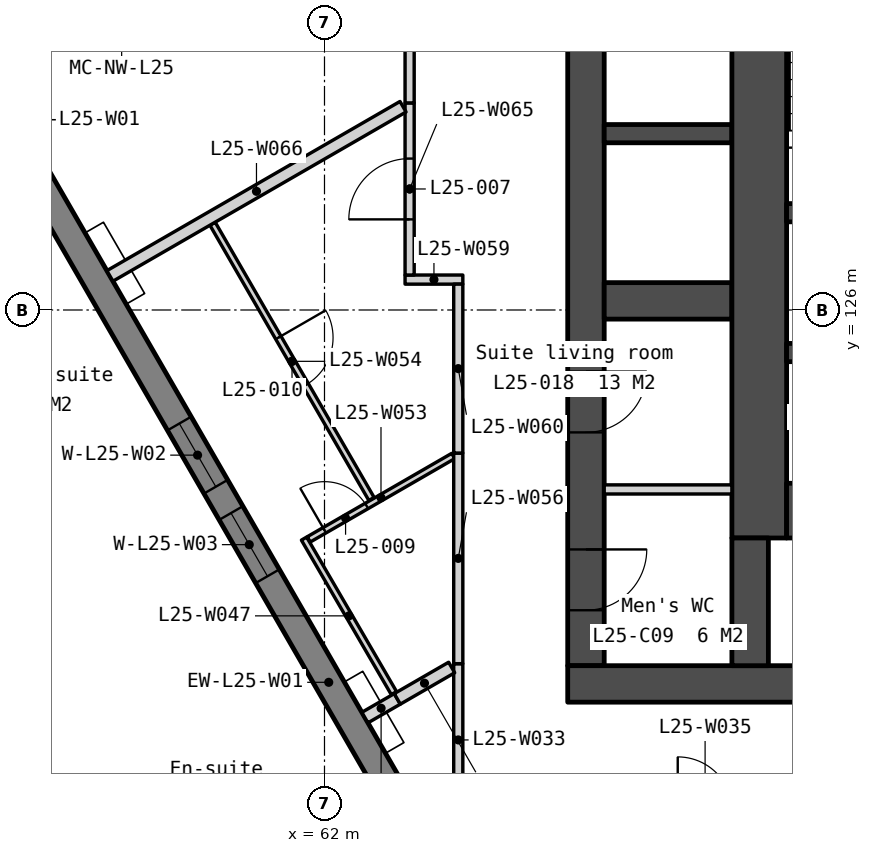
"""IFC4 building model, lengths in metres.
Left out: names, types, materials, properties, quantities, classifications, styles, units other than length and angle.
Written with IfcOpenShell. Run it as: python <this file> out.ifc"""

import sys

from ifc_helpers import new_model, si_unit, direction, frame, frame_2d, origin, place, context, subcontext, project, spatial, polyline, rectangle, outline, extrude, element, fill, save


model = new_model("IFC4")
c1 = context("Model", 3, precision=1e-05, world=origin(), true_north=direction((0.0, 1.0)))
c2 = subcontext(c1, "Body", "Model", "MODEL_VIEW")
j1 = project(units=[si_unit("LENGTHUNIT", "METRE"), si_unit("PLANEANGLEUNIT", "RADIAN")], contexts=[c1])
p1 = place(None, origin())
s1 = spatial("IfcSite", under=j1, at=p1, CompositionType="ELEMENT")
p2 = place(p1, origin())
s2 = spatial("IfcBuilding", under=s1, at=p2, CompositionType="ELEMENT")
p3 = place(p2, frame((0.0, 0.0, 102.8)))
s3 = spatial("IfcBuildingStorey", under=s2, at=p3, CompositionType="ELEMENT", Elevation=102.8)
p4 = place(p3, frame((66.3, 133.95, 0.0), z_axis=(0.0, 0.0, 1.0), x_axis=(0.0, -1.0, 0.0)))
e1 = element("IfcWall", 1, at=p4, inside=s3, PredefinedType="SOLIDWALL", context=c2, shape_type="SweptSolid", body=[
    extrude(rectangle(XDim=13.8, YDim=0.6, at=frame_2d((6.9, 0.0))), origin(), (0.0, 0.0, 1.0), 3.35),
])
p5 = place(p4, frame((0.6, 0.0, 0.0)))
e2 = element("IfcOpeningElement", 2, at=p5, cuts=e1, PredefinedType="OPENING", context=c2, shape_type="SweptSolid", body=[
    extrude(rectangle(XDim=1.1, YDim=2.1, at=frame_2d((0.55, 1.05))), frame((0.0, 0.31, 0.0), z_axis=(0.0, -1.0, 0.0), x_axis=(1.0, 0.0, 0.0)), (0.0, 0.0, 1.0), 0.62),
])
p6 = place(p4, frame((8.963, 0.0, 0.0)))
e3 = element("IfcOpeningElement", 3, at=p6, cuts=e1, PredefinedType="OPENING", context=c2, shape_type="SweptSolid", body=[
    extrude(rectangle(XDim=1.0, YDim=2.1, at=frame_2d((0.5, 1.05))), frame((0.0, 0.31, 0.0), z_axis=(0.0, -1.0, 0.0), x_axis=(1.0, 0.0, 0.0)), (0.0, 0.0, 1.0), 0.62),
])
p7 = place(p4, frame((11.888, 0.0, 0.0)))
e4 = element("IfcOpeningElement", 4, at=p7, cuts=e1, PredefinedType="OPENING", context=c2, shape_type="SweptSolid", body=[
    extrude(rectangle(XDim=1.0, YDim=2.1, at=frame_2d((0.5, 1.05))), frame((0.0, 0.31, 0.0), z_axis=(0.0, -1.0, 0.0), x_axis=(1.0, 0.0, 0.0)), (0.0, 0.0, 1.0), 0.62),
])
p8 = place(p3, frame((66.0, 119.85, 0.0), z_axis=(0.0, 0.0, 1.0), x_axis=(1.0, 0.0, 0.0)))
e5 = element("IfcWall", 5, at=p8, inside=s3, PredefinedType="SOLIDWALL", context=c2, shape_type="SweptSolid", body=[
    extrude(rectangle(XDim=28.0, YDim=0.6, at=frame_2d((14.0, 0.0))), origin(), (0.0, 0.0, 1.0), 3.35),
])
p9 = place(p8, frame((6.825, 0.0, 0.0)))
e6 = element("IfcOpeningElement", 6, at=p9, cuts=e5, PredefinedType="OPENING", context=c2, shape_type="SweptSolid", body=[
    extrude(rectangle(XDim=1.8, YDim=2.1, at=frame_2d((0.9, 1.05))), frame((0.0, 0.31, 0.0), z_axis=(0.0, -1.0, 0.0), x_axis=(1.0, 0.0, 0.0)), (0.0, 0.0, 1.0), 0.62),
])
p10 = place(p8, frame((15.85, 0.0, 0.0)))
e7 = element("IfcOpeningElement", 7, at=p10, cuts=e5, PredefinedType="OPENING", context=c2, shape_type="SweptSolid", body=[
    extrude(rectangle(XDim=1.5, YDim=2.1, at=frame_2d((0.75, 1.05))), frame((0.0, 0.31, 0.0), z_axis=(0.0, -1.0, 0.0), x_axis=(1.0, 0.0, 0.0)), (0.0, 0.0, 1.0), 0.62),
])
p11 = place(p8, frame((19.375, 0.0, 0.0)))
e8 = element("IfcOpeningElement", 8, at=p11, cuts=e5, PredefinedType="OPENING", context=c2, shape_type="SweptSolid", body=[
    extrude(rectangle(XDim=1.8, YDim=2.1, at=frame_2d((0.9, 1.05))), frame((0.0, 0.31, 0.0), z_axis=(0.0, -1.0, 0.0), x_axis=(1.0, 0.0, 0.0)), (0.0, 0.0, 1.0), 0.62),
])
p12 = place(p8, frame((4.425, 0.0, 0.0)))
e9 = element("IfcOpeningElement", 9, at=p12, cuts=e5, PredefinedType="OPENING", context=c2, shape_type="SweptSolid", body=[
    extrude(rectangle(XDim=1.0, YDim=2.1, at=frame_2d((0.5, 1.05))), frame((0.0, 0.31, 0.0), z_axis=(0.0, -1.0, 0.0), x_axis=(1.0, 0.0, 0.0)), (0.0, 0.0, 1.0), 0.62),
])
p13 = place(p8, frame((9.783, 0.0, 0.0)))
e10 = element("IfcOpeningElement", 10, at=p13, cuts=e5, PredefinedType="OPENING", context=c2, shape_type="SweptSolid", body=[
    extrude(rectangle(XDim=1.0, YDim=2.1, at=frame_2d((0.5, 1.05))), frame((0.0, 0.31, 0.0), z_axis=(0.0, -1.0, 0.0), x_axis=(1.0, 0.0, 0.0)), (0.0, 0.0, 1.0), 0.62),
])
p14 = place(p8, frame((11.525, 0.0, 0.0)))
e11 = element("IfcOpeningElement", 11, at=p14, cuts=e5, PredefinedType="OPENING", context=c2, shape_type="SweptSolid", body=[
    extrude(rectangle(XDim=1.0, YDim=2.1, at=frame_2d((0.5, 1.05))), frame((0.0, 0.31, 0.0), z_axis=(0.0, -1.0, 0.0), x_axis=(1.0, 0.0, 0.0)), (0.0, 0.0, 1.0), 0.62),
])
p15 = place(p8, frame((13.658, 0.0, 0.0)))
e12 = element("IfcOpeningElement", 12, at=p15, cuts=e5, PredefinedType="OPENING", context=c2, shape_type="SweptSolid", body=[
    extrude(rectangle(XDim=1.0, YDim=2.1, at=frame_2d((0.5, 1.05))), frame((0.0, 0.31, 0.0), z_axis=(0.0, -1.0, 0.0), x_axis=(1.0, 0.0, 0.0)), (0.0, 0.0, 1.0), 0.62),
])
p16 = place(p8, frame((22.575, 0.0, 0.0)))
e13 = element("IfcOpeningElement", 13, at=p16, cuts=e5, PredefinedType="OPENING", context=c2, shape_type="SweptSolid", body=[
    extrude(rectangle(XDim=1.0, YDim=2.1, at=frame_2d((0.5, 1.05))), frame((0.0, 0.31, 0.0), z_axis=(0.0, -1.0, 0.0), x_axis=(1.0, 0.0, 0.0)), (0.0, 0.0, 1.0), 0.62),
])
p17 = place(p3, frame((66.6, 128.9, 0.0), z_axis=(0.0, 0.0, 1.0), x_axis=(1.0, 0.0, 0.0)))
e14 = element("IfcWall", 14, at=p17, inside=s3, PredefinedType="SOLIDWALL", context=c2, shape_type="SweptSolid", body=[
    extrude(rectangle(XDim=2.1, YDim=0.3, at=frame_2d((1.05, 0.0))), origin(), (0.0, 0.0, 1.0), 3.35),
])
p18 = place(p3, frame((66.6, 126.15, 0.0), z_axis=(0.0, 0.0, 1.0), x_axis=(1.0, 0.0, 0.0)))
e15 = element("IfcWall", 15, at=p18, inside=s3, PredefinedType="SOLIDWALL", context=c2, shape_type="SweptSolid", body=[
    extrude(rectangle(XDim=2.1, YDim=0.6, at=frame_2d((1.05, 0.0))), origin(), (0.0, 0.0, 1.0), 3.35),
])
p19 = place(p3, frame((66.6, 123.049, 0.0), z_axis=(0.0, 0.0, 1.0), x_axis=(1.0, 0.0, 0.0)))
e16 = element("IfcWall", 16, at=p19, inside=s3, PredefinedType="PARTITIONING", context=c2, shape_type="SweptSolid", body=[
    extrude(rectangle(XDim=2.1, YDim=0.15, at=frame_2d((1.05, 0.0))), origin(), (0.0, 0.0, 1.0), 3.35),
])
p20 = place(p3, frame((69.15, 133.95, 0.0), z_axis=(0.0, 0.0, 1.0), x_axis=(0.0, -1.0, 0.0)))
e17 = element("IfcWall", 17, at=p20, inside=s3, PredefinedType="SOLIDWALL", context=c2, shape_type="SweptSolid", body=[
    extrude(rectangle(XDim=11.7, YDim=0.9, at=frame_2d((5.85, 0.0))), origin(), (0.0, 0.0, 1.0), 3.35),
])
p21 = place(p3, frame((69.0, 122.25, 0.0), z_axis=(0.0, 0.0, 1.0), x_axis=(0.0, -1.0, 0.0)))
e18 = element("IfcWall", 18, at=p21, inside=s3, PredefinedType="SOLIDWALL", context=c2, shape_type="SweptSolid", body=[
    extrude(rectangle(XDim=2.1, YDim=0.6, at=frame_2d((1.05, 0.0))), origin(), (0.0, 0.0, 1.0), 3.35),
])
for number, where, z_axis, x_axis in (
    (19, (69.6, 127.6, 0.0), (0.0, 0.0, 1.0), (1.0, 0.0, 0.0)),
    (20, (69.6, 125.3, 0.0), (0.0, 0.0, 1.0), (1.0, 0.0, 0.0)),
):
    element("IfcWall", number, at=place(p3, frame(where, z_axis=z_axis, x_axis=x_axis)), inside=s3, PredefinedType="SOLIDWALL", context=c2, shape_type="SweptSolid", body=[
        extrude(rectangle(XDim=2.55, YDim=0.3, at=frame_2d((1.275, 0.0))), origin(), (0.0, 0.0, 1.0), 3.35),
    ])
p22 = place(p3, frame((69.6, 122.7, 0.0), z_axis=(0.0, 0.0, 1.0), x_axis=(1.0, 0.0, 0.0)))
e21 = element("IfcWall", 21, at=p22, inside=s3, PredefinedType="SOLIDWALL", context=c2, shape_type="SweptSolid", body=[
    extrude(rectangle(XDim=2.55, YDim=0.9, at=frame_2d((1.275, 0.0))), origin(), (0.0, 0.0, 1.0), 3.35),
])
p23 = place(p3, frame((0.0, 0.0, -0.15)))
e22 = element("IfcWall", 22, at=p23, inside=s3, PredefinedType="SOLIDWALL", context=c2, shape_type="SweptSolid", body=[
    extrude(outline(polyline([(58.678, 135.0), (58.678, 134.55), (58.938, 134.55), (56.398, 130.15), (56.268, 130.375), (55.878, 130.15), (58.678, 135.0)])), origin(), (0.0, 0.0, 1.0), 3.5),
])
p24 = place(p3, frame((56.073, 130.263, -0.15), z_axis=(0.0, 0.0, 1.0), x_axis=(0.500002343971, -0.866024050488, 0.0)))
e23 = element("IfcWall", 23, at=p24, inside=s3, PredefinedType="SOLIDWALL", context=c2, shape_type="SweptSolid", body=[
    extrude(outline(polyline([(0.0, 0.0), (0.0, 3.5), (23.986, 3.5), (23.986, 0.0), (0.0, 0.0)])), frame((0.0, 0.225, 0.0), z_axis=(0.0, -1.0, 0.0), x_axis=(1.0, 0.0, 0.0)), (0.0, 0.0, 1.0), 0.45),
])
p25 = place(p24, frame((0.72, 0.0, 1.05)))
e24 = element("IfcOpeningElement", 24, at=p25, cuts=e23, PredefinedType="OPENING", context=c2, shape_type="SweptSolid", body=[
    extrude(rectangle(XDim=1.2, YDim=1.5, at=frame_2d((0.6, 0.75))), frame((0.0, 0.235, 0.0), z_axis=(0.0, -1.0, 0.0), x_axis=(1.0, 0.0, 0.0)), (0.0, 0.0, 1.0), 0.47),
])
p26 = place(p24, frame((7.079, 0.0, 1.05)))
e25 = element("IfcOpeningElement", 25, at=p26, cuts=e23, PredefinedType="OPENING", context=c2, shape_type="SweptSolid", body=[
    extrude(rectangle(XDim=1.2, YDim=1.5, at=frame_2d((0.6, 0.75))), frame((0.0, 0.235, 0.0), z_axis=(0.0, -1.0, 0.0), x_axis=(1.0, 0.0, 0.0)), (0.0, 0.0, 1.0), 0.47),
])
p27 = place(p24, frame((8.779, 0.0, 1.05)))
e26 = element("IfcOpeningElement", 26, at=p27, cuts=e23, PredefinedType="OPENING", context=c2, shape_type="SweptSolid", body=[
    extrude(rectangle(XDim=1.2, YDim=1.5, at=frame_2d((0.6, 0.75))), frame((0.0, 0.235, 0.0), z_axis=(0.0, -1.0, 0.0), x_axis=(1.0, 0.0, 0.0)), (0.0, 0.0, 1.0), 0.47),
])
p28 = place(p24, frame((15.607, 0.0, 1.05)))
e27 = element("IfcOpeningElement", 27, at=p28, cuts=e23, PredefinedType="OPENING", context=c2, shape_type="SweptSolid", body=[
    extrude(rectangle(XDim=1.2, YDim=1.5, at=frame_2d((0.6, 0.75))), frame((0.0, 0.235, 0.0), z_axis=(0.0, -1.0, 0.0), x_axis=(1.0, 0.0, 0.0)), (0.0, 0.0, 1.0), 0.47),
])
p29 = place(p24, frame((17.307, 0.0, 1.05)))
e28 = element("IfcOpeningElement", 28, at=p29, cuts=e23, PredefinedType="OPENING", context=c2, shape_type="SweptSolid", body=[
    extrude(rectangle(XDim=1.2, YDim=1.5, at=frame_2d((0.6, 0.75))), frame((0.0, 0.235, 0.0), z_axis=(0.0, -1.0, 0.0), x_axis=(1.0, 0.0, 0.0)), (0.0, 0.0, 1.0), 0.47),
])
p30 = place(p3, frame((0.0, 0.0, -0.15)))
e29 = element("IfcWall", 29, at=p30, inside=s3, PredefinedType="SOLIDWALL", context=c2, shape_type="SweptSolid", body=[
    extrude(outline(polyline([(58.678, 135.0), (54.84, 134.116), (55.878, 130.15), (58.678, 135.0)])), origin(), (0.0, 0.0, 1.0), 3.5),
])
p31 = place(p3, frame((64.2, 117.675, 0.0), z_axis=(0.0, 0.0, 1.0), x_axis=(0.0, 1.0, 0.0)))
e30 = element("IfcWall", 30, at=p31, inside=s3, PredefinedType="PARTITIONING", context=c2, shape_type="SweptSolid", body=[
    extrude(rectangle(XDim=2.508, YDim=0.15, at=frame_2d((1.254, 0.0))), origin(), (0.0, 0.0, 1.0), 3.35),
])
p32 = place(p3, frame((62.665, 119.296, 0.0), z_axis=(0.0, 0.0, 1.0), x_axis=(0.86615915044, 0.499768272412, 0.0)))
e31 = element("IfcWall", 31, at=p32, inside=s3, PredefinedType="PARTITIONING", context=c2, shape_type="SweptSolid", body=[
    extrude(rectangle(XDim=0.615, YDim=0.2, at=frame_2d((0.308, 0.0))), origin(), (0.0, 0.0, 1.0), 3.35),
])
p33 = place(p3, frame((61.663, 122.24, 0.0), z_axis=(0.0, 0.0, 1.0), x_axis=(0.502884554521, -0.864353587847, 0.0)))
e32 = element("IfcWall", 32, at=p33, inside=s3, PredefinedType="PARTITIONING", context=c2, shape_type="SweptSolid", body=[
    extrude(rectangle(XDim=2.94, YDim=0.1, at=frame_2d((1.47, 0.0))), origin(), (0.0, 0.0, 1.0), 3.35),
])
p34 = place(p3, frame((63.197, 119.604, 0.0), z_axis=(0.0, 0.0, 1.0), x_axis=(0.866067506982, 0.499927068031, 0.0)))
e33 = element("IfcWall", 33, at=p34, inside=s3, PredefinedType="PARTITIONING", context=c2, shape_type="SweptSolid", body=[
    extrude(rectangle(XDim=1.033, YDim=0.2, at=frame_2d((0.517, 0.0))), origin(), (0.0, 0.0, 1.0), 3.35),
])
p35 = place(p3, frame((61.74, 122.227, 0.0), z_axis=(0.0, 0.0, 1.0), x_axis=(0.866012292785, 0.50002270823, 0.0)))
e34 = element("IfcWall", 34, at=p35, inside=s3, PredefinedType="PARTITIONING", context=c2, shape_type="SweptSolid", body=[
    extrude(rectangle(XDim=2.745, YDim=0.1, at=frame_2d((1.373, 0.0))), origin(), (0.0, 0.0, 1.0), 3.35),
])
p36 = place(p35, frame((0.3, 0.0, 0.0)))
e35 = element("IfcOpeningElement", 35, at=p36, cuts=e34, PredefinedType="OPENING", context=c2, shape_type="SweptSolid", body=[
    extrude(rectangle(XDim=0.8, YDim=2.1, at=frame_2d((0.4, 1.05))), frame((0.0, 0.06, 0.0), z_axis=(0.0, -1.0, 0.0), x_axis=(1.0, 0.0, 0.0)), (0.0, 0.0, 1.0), 0.12),
])
p37 = place(p3, frame((60.159, 127.419, 0.0), z_axis=(0.0, 0.0, 1.0), x_axis=(0.499971765402, -0.866041704423, 0.0)))
e36 = element("IfcWall", 36, at=p37, inside=s3, PredefinedType="PARTITIONING", context=c2, shape_type="SweptSolid", body=[
    extrude(rectangle(XDim=5.227, YDim=0.1, at=frame_2d((2.614, 0.0))), origin(), (0.0, 0.0, 1.0), 3.35),
])
p38 = place(p37, frame((2.164, 0.0, 0.0)))
e37 = element("IfcOpeningElement", 37, at=p38, cuts=e36, PredefinedType="OPENING", context=c2, shape_type="SweptSolid", body=[
    extrude(rectangle(XDim=0.9, YDim=2.1, at=frame_2d((0.45, 1.05))), frame((0.0, 0.06, 0.0), z_axis=(0.0, -1.0, 0.0), x_axis=(1.0, 0.0, 0.0)), (0.0, 0.0, 1.0), 0.12),
])
p39 = place(p3, frame((64.2, 120.183, 0.0), z_axis=(0.0, 0.0, 1.0), x_axis=(0.0, 1.0, 0.0)))
e38 = element("IfcWall", 38, at=p39, inside=s3, PredefinedType="PARTITIONING", context=c2, shape_type="SweptSolid", body=[
    extrude(rectangle(XDim=3.464, YDim=0.15, at=frame_2d((1.732, 0.0))), origin(), (0.0, 0.0, 1.0), 3.35),
])
p40 = place(p3, frame((63.325, 126.5, 0.0), z_axis=(0.0, 0.0, 1.0), x_axis=(1.0, 0.0, 0.0)))
e39 = element("IfcWall", 39, at=p40, inside=s3, PredefinedType="PARTITIONING", context=c2, shape_type="SweptSolid", body=[
    extrude(rectangle(XDim=0.95, YDim=0.15, at=frame_2d((0.475, 0.0))), origin(), (0.0, 0.0, 1.0), 3.35),
])
p41 = place(p3, frame((64.2, 123.647, 0.0), z_axis=(0.0, 0.0, 1.0), x_axis=(0.0, 1.0, 0.0)))
e40 = element("IfcWall", 40, at=p41, inside=s3, PredefinedType="PARTITIONING", context=c2, shape_type="SweptSolid", body=[
    extrude(rectangle(XDim=2.778, YDim=0.15, at=frame_2d((1.389, 0.0))), origin(), (0.0, 0.0, 1.0), 3.35),
])
p42 = place(p3, frame((63.4, 126.575, 0.0), z_axis=(0.0, 0.0, 1.0), x_axis=(0.0, 1.0, 0.0)))
e41 = element("IfcWall", 41, at=p42, inside=s3, PredefinedType="PARTITIONING", context=c2, shape_type="SweptSolid", body=[
    extrude(rectangle(XDim=2.831, YDim=0.15, at=frame_2d((1.416, 0.0))), origin(), (0.0, 0.0, 1.0), 3.35),
])
p43 = place(p42, frame((0.915, 0.0, 0.0)))
e42 = element("IfcOpeningElement", 42, at=p43, cuts=e41, PredefinedType="OPENING", context=c2, shape_type="SweptSolid", body=[
    extrude(rectangle(XDim=1.0, YDim=2.1, at=frame_2d((0.5, 1.05))), frame((0.0, 0.085, 0.0), z_axis=(0.0, -1.0, 0.0), x_axis=(1.0, 0.0, 0.0)), (0.0, 0.0, 1.0), 0.17),
])
p44 = place(p3, frame((58.471, 126.56, 0.0), z_axis=(0.0, 0.0, 1.0), x_axis=(0.866013219245, 0.500021103647, 0.0)))
e43 = element("IfcWall", 43, at=p44, inside=s3, PredefinedType="PARTITIONING", context=c2, shape_type="SweptSolid", body=[
    extrude(rectangle(XDim=5.567, YDim=0.2, at=frame_2d((2.783, 0.0))), origin(), (0.0, 0.0, 1.0), 3.35),
])
p45 = place(p3, frame((63.4, 129.406, 0.0), z_axis=(0.0, 0.0, 1.0), x_axis=(0.0, 1.0, 0.0)))
e44 = element("IfcWall", 44, at=p45, inside=s3, PredefinedType="PARTITIONING", context=c2, shape_type="SweptSolid", body=[
    extrude(rectangle(XDim=4.669, YDim=0.15, at=frame_2d((2.334, 0.0))), origin(), (0.0, 0.0, 1.0), 3.35),
])
p46 = place(p45, frame((1.835, 0.0, 0.0)))
e45 = element("IfcOpeningElement", 45, at=p46, cuts=e44, PredefinedType="OPENING", context=c2, shape_type="SweptSolid", body=[
    extrude(rectangle(XDim=1.0, YDim=2.1, at=frame_2d((0.5, 1.05))), frame((0.0, 0.085, 0.0), z_axis=(0.0, -1.0, 0.0), x_axis=(1.0, 0.0, 0.0)), (0.0, 0.0, 1.0), 0.17),
])
p47 = place(p6, origin())
e46 = element("IfcDoor", 46, at=p47, inside=s3, OperationType="SINGLE_SWING_LEFT", PredefinedType="DOOR", context=c2, shape_type="SweptSolid", body=[
    extrude(rectangle(XDim=1.0, YDim=2.1, at=frame_2d((0.5, 1.05))), frame((0.0, 0.025, 0.0), z_axis=(0.0, -1.0, 0.0), x_axis=(1.0, 0.0, 0.0)), (0.0, 0.0, 1.0), 0.05),
])
fill(e3, e46)
p48 = place(p7, origin())
e47 = element("IfcDoor", 47, at=p48, inside=s3, OperationType="SINGLE_SWING_LEFT", PredefinedType="DOOR", context=c2, shape_type="SweptSolid", body=[
    extrude(rectangle(XDim=1.0, YDim=2.1, at=frame_2d((0.5, 1.05))), frame((0.0, 0.025, 0.0), z_axis=(0.0, -1.0, 0.0), x_axis=(1.0, 0.0, 0.0)), (0.0, 0.0, 1.0), 0.05),
])
fill(e4, e47)
p49 = place(p26, origin())
e48 = element("IfcWindow", 48, at=p49, inside=s3, PartitioningType="SINGLE_PANEL", PredefinedType="WINDOW", context=c2, shape_type="SweptSolid", body=[
    extrude(rectangle(XDim=1.2, YDim=1.5, at=frame_2d((0.6, 0.75))), frame((0.0, 0.03, 0.0), z_axis=(0.0, -1.0, 0.0), x_axis=(1.0, 0.0, 0.0)), (0.0, 0.0, 1.0), 0.06),
])
fill(e25, e48)
p50 = place(p27, origin())
e49 = element("IfcWindow", 49, at=p50, inside=s3, PartitioningType="SINGLE_PANEL", PredefinedType="WINDOW", context=c2, shape_type="SweptSolid", body=[
    extrude(rectangle(XDim=1.2, YDim=1.5, at=frame_2d((0.6, 0.75))), frame((0.0, 0.03, 0.0), z_axis=(0.0, -1.0, 0.0), x_axis=(1.0, 0.0, 0.0)), (0.0, 0.0, 1.0), 0.06),
])
fill(e26, e49)
p51 = place(p43, origin())
e50 = element("IfcDoor", 50, at=p51, inside=s3, OperationType="SINGLE_SWING_LEFT", PredefinedType="DOOR", context=c2, shape_type="SweptSolid", body=[
    extrude(rectangle(XDim=1.0, YDim=2.1, at=frame_2d((0.5, 1.05))), frame((0.0, 0.025, 0.0), z_axis=(0.0, -1.0, 0.0), x_axis=(1.0, 0.0, 0.0)), (0.0, 0.0, 1.0), 0.05),
])
fill(e42, e50)
p52 = place(p36, origin())
e51 = element("IfcDoor", 51, at=p52, inside=s3, OperationType="SINGLE_SWING_LEFT", PredefinedType="DOOR", context=c2, shape_type="SweptSolid", body=[
    extrude(rectangle(XDim=0.8, YDim=2.1, at=frame_2d((0.4, 1.05))), frame((0.0, 0.025, 0.0), z_axis=(0.0, -1.0, 0.0), x_axis=(1.0, 0.0, 0.0)), (0.0, 0.0, 1.0), 0.05),
])
fill(e35, e51)
p53 = place(p38, origin())
e52 = element("IfcDoor", 52, at=p53, inside=s3, OperationType="SINGLE_SWING_LEFT", PredefinedType="DOOR", context=c2, shape_type="SweptSolid", body=[
    extrude(rectangle(XDim=0.9, YDim=2.1, at=frame_2d((0.45, 1.05))), frame((0.0, 0.025, 0.0), z_axis=(0.0, -1.0, 0.0), x_axis=(1.0, 0.0, 0.0)), (0.0, 0.0, 1.0), 0.05),
])
fill(e37, e52)
save(model, sys.argv[1])
